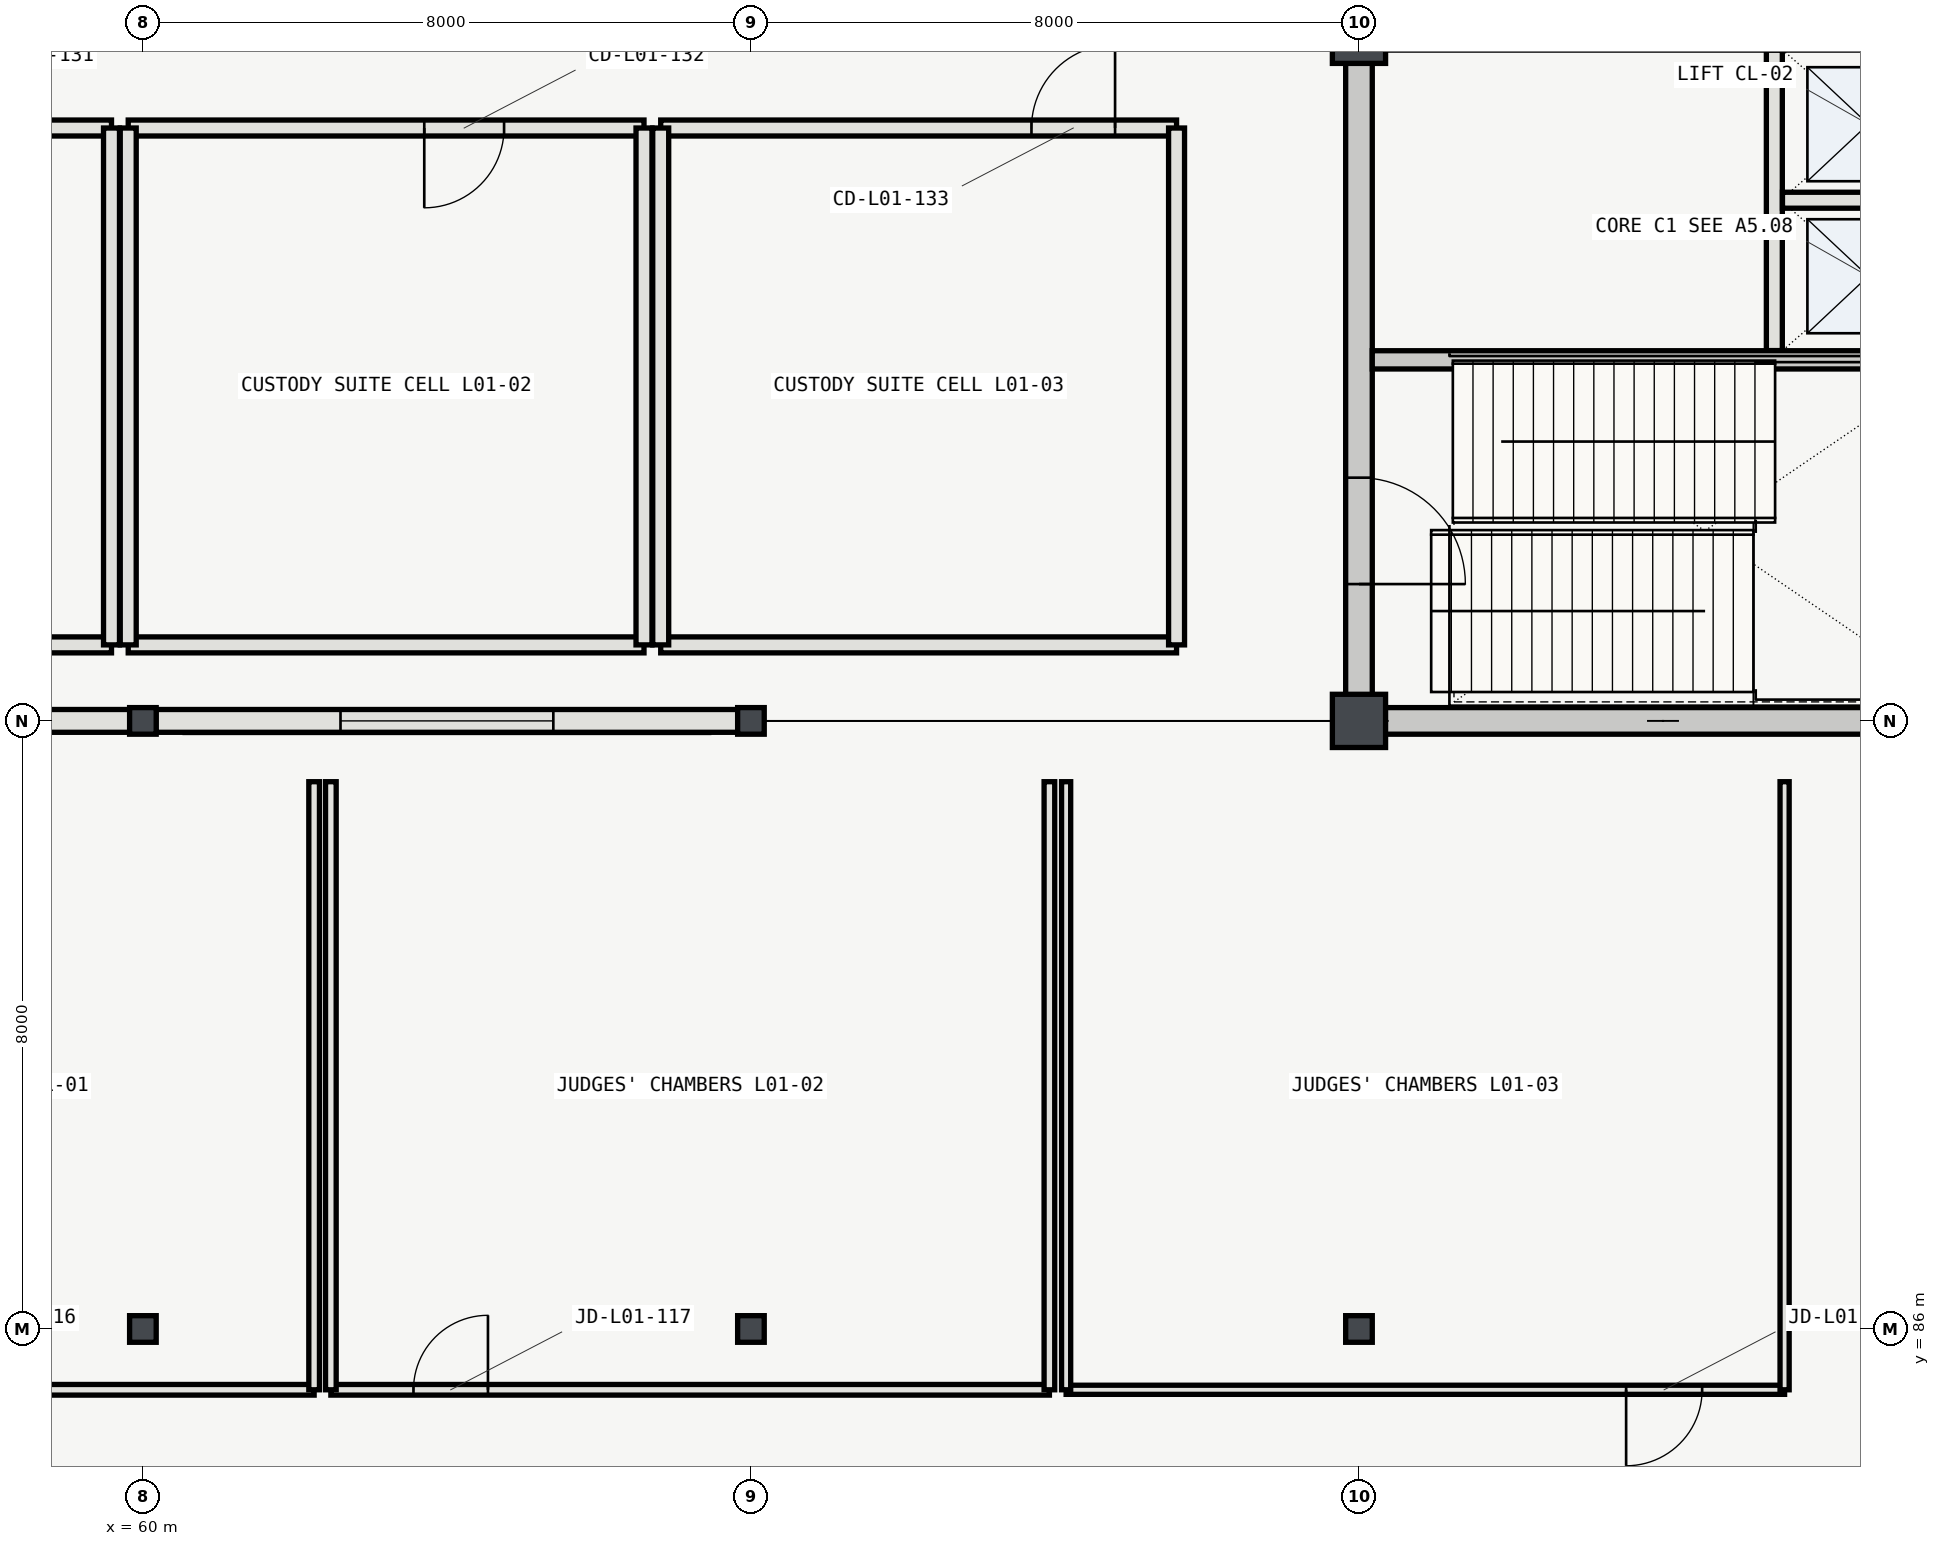
"""IFC4 building model, lengths in metres.
Left out: names, types, materials, properties, quantities, classifications, styles, units other than length and angle.
Written with IfcOpenShell. Run it as: python <this file> out.ifc"""

import sys

from ifc_helpers import new_model, si_unit, direction, frame, frame_2d, origin, origin_2d, place, context, subcontext, project, spatial, rectangle, i_section, extrude, element, fill, save


model = new_model("IFC4")
c1 = context("Model", 3, precision=1e-05, world=origin(), true_north=direction((0.0, 1.0)))
c2 = subcontext(c1, "Body", "Model", "MODEL_VIEW")
j1 = project(units=[si_unit("LENGTHUNIT", "METRE"), si_unit("PLANEANGLEUNIT", "RADIAN")], contexts=[c1])
p1 = place(None, origin())
s1 = spatial("IfcSite", under=j1, at=p1, CompositionType="ELEMENT")
p2 = place(p1, origin())
s2 = spatial("IfcBuilding", under=s1, at=p2, CompositionType="ELEMENT")
p3 = place(p2, frame((0.0, 0.0, 5.4)))
s3 = spatial("IfcBuildingStorey", under=s2, at=p3, CompositionType="ELEMENT", Elevation=5.4)
for number, where, z_axis, x_axis in (
    (1, (60.0, 86.0, 0.0), (0.0, 0.0, 1.0), (1.0, 0.0, 0.0)),
    (2, (60.0, 94.0, 0.0), (0.0, 0.0, 1.0), (1.0, 0.0, 0.0)),
    (3, (68.0, 86.0, 0.0), (0.0, 0.0, 1.0), (1.0, 0.0, 0.0)),
    (4, (68.0, 94.0, 0.0), (0.0, 0.0, 1.0), (1.0, 0.0, 0.0)),
    (5, (76.0, 86.0, 0.0), (0.0, 0.0, 1.0), (1.0, 0.0, 0.0)),
):
    element("IfcColumn", number, at=place(p3, frame(where, z_axis=z_axis, x_axis=x_axis)), inside=s3, PredefinedType="COLUMN", context=c2, shape_type="SweptSolid", body=[
        extrude(i_section(OverallWidth=0.35, OverallDepth=0.35, WebThickness=0.012, FlangeThickness=0.019, FilletRadius=0.02, at=origin_2d()), origin(), (0.0, 0.0, 1.0), 5.4),
    ])
for number, where, z_axis, x_axis in (
    (6, (76.0, 94.0, 0.0), (0.0, 0.0, 1.0), (1.0, 0.0, 0.0)),
    (7, (76.0, 103.0, 0.0), (0.0, 0.0, 1.0), (1.0, 0.0, 0.0)),
):
    element("IfcColumn", number, at=place(p3, frame(where, z_axis=z_axis, x_axis=x_axis)), inside=s3, PredefinedType="COLUMN", context=c2, shape_type="SweptSolid", body=[
        extrude(rectangle(XDim=0.7, YDim=0.7, at=origin_2d()), origin(), (0.0, 0.0, 1.0), 5.4),
    ])
p4 = place(p3, frame((59.829, 94.0, 0.0), z_axis=(0.0, 0.0, 1.0), x_axis=(-1.0, 0.0, 0.0)))
e8 = element("IfcWall", 8, at=p4, inside=s3, PredefinedType="SOLIDWALL", context=c2, shape_type="SweptSolid", body=[
    extrude(rectangle(XDim=7.658, YDim=0.3, at=frame_2d((3.829, 0.0))), origin(), (0.0, 0.0, 1.0), 4.803),
])
p5 = place(p4, frame((2.229, 0.0, 0.95)))
e9 = element("IfcOpeningElement", 9, at=p5, cuts=e8, PredefinedType="OPENING", context=c2, shape_type="SweptSolid", body=[
    extrude(rectangle(XDim=3.2, YDim=2.6, at=frame_2d((1.6, 1.3))), frame((0.0, 0.16, 0.0), z_axis=(0.0, -1.0, 0.0), x_axis=(1.0, 0.0, 0.0)), (0.0, 0.0, 1.0), 0.32),
])
p6 = place(p3, frame((67.829, 94.0, 0.0), z_axis=(0.0, 0.0, 1.0), x_axis=(-1.0, 0.0, 0.0)))
e10 = element("IfcWall", 10, at=p6, inside=s3, PredefinedType="SOLIDWALL", context=c2, shape_type="SweptSolid", body=[
    extrude(rectangle(XDim=7.658, YDim=0.3, at=frame_2d((3.829, 0.0))), origin(), (0.0, 0.0, 1.0), 4.803),
])
p7 = place(p6, frame((2.429, 0.0, 0.95)))
e11 = element("IfcOpeningElement", 11, at=p7, cuts=e10, PredefinedType="OPENING", context=c2, shape_type="SweptSolid", body=[
    extrude(rectangle(XDim=2.8, YDim=2.6, at=frame_2d((1.4, 1.3))), frame((0.0, 0.16, 0.0), z_axis=(0.0, -1.0, 0.0), x_axis=(1.0, 0.0, 0.0)), (0.0, 0.0, 1.0), 0.32),
])
p8 = place(p3, frame((75.825, 94.0, 0.0), z_axis=(0.0, 0.0, 1.0), x_axis=(1.0, 0.0, 0.0)))
e12 = element("IfcWall", 12, at=p8, inside=s3, PredefinedType="SHEAR", context=c2, shape_type="SweptSolid", body=[
    extrude(rectangle(XDim=8.35, YDim=0.35, at=frame_2d((4.175, 0.0))), origin(), (0.0, 0.0, 1.0), 5.12),
])
p9 = place(p3, frame((76.0, 94.175, 0.0), z_axis=(0.0, 0.0, 1.0), x_axis=(0.0, 1.0, 0.0)))
e13 = element("IfcWall", 13, at=p9, inside=s3, PredefinedType="SHEAR", context=c2, shape_type="SweptSolid", body=[
    extrude(rectangle(XDim=8.65, YDim=0.35, at=frame_2d((4.325, 0.0))), origin(), (0.0, 0.0, 1.0), 5.12),
])
p10 = place(p9, frame((1.625, 0.0, 0.0)))
e14 = element("IfcOpeningElement", 14, at=p10, cuts=e13, PredefinedType="OPENING", context=c2, shape_type="SweptSolid", body=[
    extrude(rectangle(XDim=1.4, YDim=2.2, at=frame_2d((0.7, 1.1))), frame((0.0, 0.185, 0.0), z_axis=(0.0, -1.0, 0.0), x_axis=(1.0, 0.0, 0.0)), (0.0, 0.0, 1.0), 0.37),
])
p11 = place(p3, frame((81.465, 98.872, 0.0), z_axis=(0.0, 0.0, 1.0), x_axis=(0.0, 1.0, 0.0)))
e15 = element("IfcWall", 15, at=p11, inside=s3, PredefinedType="PARTITIONING", context=c2, shape_type="SweptSolid", body=[
    extrude(rectangle(XDim=3.951, YDim=0.21, at=frame_2d((1.976, 0.0))), origin(), (0.0, 0.0, 1.0), 5.12),
])
p12 = place(p3, frame((81.572, 100.85, 0.0), z_axis=(0.0, 0.0, 1.0), x_axis=(1.0, 0.0, 0.0)))
e16 = element("IfcWall", 16, at=p12, inside=s3, PredefinedType="PARTITIONING", context=c2, shape_type="SweptSolid", body=[
    extrude(rectangle(XDim=2.251, YDim=0.21, at=frame_2d((1.125, 0.0))), origin(), (0.0, 0.0, 1.0), 5.12),
])
p13 = place(p3, frame((52.8, 85.2, 0.0), z_axis=(0.0, 0.0, 1.0), x_axis=(1.0, 0.0, 0.0)))
e17 = element("IfcWall", 17, at=p13, inside=s3, PredefinedType="PARTITIONING", context=c2, shape_type="SweptSolid", body=[
    extrude(rectangle(XDim=9.453, YDim=0.14, at=frame_2d((4.727, 0.0))), origin(), (0.0, 0.0, 1.0), 5.12),
])
p14 = place(p13, frame((2.656, 0.0, 0.0)))
e18 = element("IfcOpeningElement", 18, at=p14, cuts=e17, PredefinedType="OPENING", context=c2, shape_type="SweptSolid", body=[
    extrude(rectangle(XDim=1.0, YDim=2.2, at=frame_2d((0.5, 1.1))), frame((0.0, 0.08, 0.0), z_axis=(0.0, -1.0, 0.0), x_axis=(1.0, 0.0, 0.0)), (0.0, 0.0, 1.0), 0.16),
])
p15 = place(p3, frame((62.253, 85.2, 0.0), z_axis=(0.0, 0.0, 1.0), x_axis=(0.0, 1.0, 0.0)))
e19 = element("IfcWall", 19, at=p15, inside=s3, PredefinedType="PARTITIONING", context=c2, shape_type="SweptSolid", body=[
    extrude(rectangle(XDim=8.0, YDim=0.14, at=frame_2d((4.0, 0.0))), origin(), (0.0, 0.0, 1.0), 5.12),
])
p16 = place(p3, frame((62.473, 85.2, 0.0), z_axis=(0.0, 0.0, 1.0), x_axis=(1.0, 0.0, 0.0)))
e20 = element("IfcWall", 20, at=p16, inside=s3, PredefinedType="PARTITIONING", context=c2, shape_type="SweptSolid", body=[
    extrude(rectangle(XDim=9.454, YDim=0.14, at=frame_2d((4.727, 0.0))), origin(), (0.0, 0.0, 1.0), 5.12),
])
p17 = place(p16, frame((1.087, 0.0, 0.0)))
e21 = element("IfcOpeningElement", 21, at=p17, cuts=e20, PredefinedType="OPENING", context=c2, shape_type="SweptSolid", body=[
    extrude(rectangle(XDim=0.98, YDim=2.2, at=frame_2d((0.49, 1.1))), frame((0.0, 0.08, 0.0), z_axis=(0.0, -1.0, 0.0), x_axis=(1.0, 0.0, 0.0)), (0.0, 0.0, 1.0), 0.16),
])
p18 = place(p3, frame((62.473, 93.2, 0.0), z_axis=(0.0, 0.0, 1.0), x_axis=(0.0, -1.0, 0.0)))
e22 = element("IfcWall", 22, at=p18, inside=s3, PredefinedType="PARTITIONING", context=c2, shape_type="SweptSolid", body=[
    extrude(rectangle(XDim=8.0, YDim=0.14, at=frame_2d((4.0, 0.0))), origin(), (0.0, 0.0, 1.0), 5.12),
])
p19 = place(p3, frame((71.927, 85.2, 0.0), z_axis=(0.0, 0.0, 1.0), x_axis=(0.0, 1.0, 0.0)))
e23 = element("IfcWall", 23, at=p19, inside=s3, PredefinedType="PARTITIONING", context=c2, shape_type="SweptSolid", body=[
    extrude(rectangle(XDim=8.0, YDim=0.14, at=frame_2d((4.0, 0.0))), origin(), (0.0, 0.0, 1.0), 4.806),
])
p20 = place(p3, frame((72.147, 85.2, 0.0), z_axis=(0.0, 0.0, 1.0), x_axis=(1.0, 0.0, 0.0)))
e24 = element("IfcWall", 24, at=p20, inside=s3, PredefinedType="PARTITIONING", context=c2, shape_type="SweptSolid", body=[
    extrude(rectangle(XDim=9.453, YDim=0.12, at=frame_2d((4.727, 0.0))), origin(), (0.0, 0.0, 1.0), 5.12),
])
p21 = place(p20, frame((7.368, 0.0, 0.0)))
e25 = element("IfcOpeningElement", 25, at=p21, cuts=e24, PredefinedType="OPENING", context=c2, shape_type="SweptSolid", body=[
    extrude(rectangle(XDim=1.0, YDim=2.15, at=frame_2d((0.5, 1.075))), frame((0.0, 0.07, 0.0), z_axis=(0.0, -1.0, 0.0), x_axis=(1.0, 0.0, 0.0)), (0.0, 0.0, 1.0), 0.14),
])
p22 = place(p3, frame((72.147, 93.2, 0.0), z_axis=(0.0, 0.0, 1.0), x_axis=(0.0, -1.0, 0.0)))
e26 = element("IfcWall", 26, at=p22, inside=s3, PredefinedType="PARTITIONING", context=c2, shape_type="SweptSolid", body=[
    extrude(rectangle(XDim=8.0, YDim=0.12, at=frame_2d((4.0, 0.0))), origin(), (0.0, 0.0, 1.0), 4.806),
])
p23 = place(p3, frame((81.6, 85.2, 0.0), z_axis=(0.0, 0.0, 1.0), x_axis=(0.0, 1.0, 0.0)))
e27 = element("IfcWall", 27, at=p23, inside=s3, PredefinedType="PARTITIONING", context=c2, shape_type="SweptSolid", body=[
    extrude(rectangle(XDim=8.0, YDim=0.12, at=frame_2d((4.0, 0.0))), origin(), (0.0, 0.0, 1.0), 5.12),
])
p24 = place(p3, frame((52.8, 95.0, 0.0), z_axis=(0.0, 0.0, 1.0), x_axis=(1.0, 0.0, 0.0)))
e28 = element("IfcWall", 28, at=p24, inside=s3, PredefinedType="PARTITIONING", context=c2, shape_type="SweptSolid", body=[
    extrude(rectangle(XDim=6.787, YDim=0.21, at=frame_2d((3.394, 0.0))), origin(), (0.0, 0.0, 1.0), 5.12),
])
p25 = place(p3, frame((59.587, 101.8, 0.0), z_axis=(0.0, 0.0, 1.0), x_axis=(-1.0, 0.0, 0.0)))
e29 = element("IfcWall", 29, at=p25, inside=s3, PredefinedType="PARTITIONING", context=c2, shape_type="SweptSolid", body=[
    extrude(rectangle(XDim=6.787, YDim=0.21, at=frame_2d((3.394, 0.0))), origin(), (0.0, 0.0, 1.0), 5.12),
])
p26 = place(p25, frame((2.844, 0.0, 0.0)))
e30 = element("IfcOpeningElement", 30, at=p26, cuts=e29, PredefinedType="OPENING", context=c2, shape_type="SweptSolid", body=[
    extrude(rectangle(XDim=1.1, YDim=2.15, at=frame_2d((0.55, 1.075))), frame((0.0, 0.115, 0.0), z_axis=(0.0, -1.0, 0.0), x_axis=(1.0, 0.0, 0.0)), (0.0, 0.0, 1.0), 0.23),
])
p27 = place(p3, frame((59.587, 95.0, 0.0), z_axis=(0.0, 0.0, 1.0), x_axis=(0.0, 1.0, 0.0)))
e31 = element("IfcWall", 31, at=p27, inside=s3, PredefinedType="PARTITIONING", context=c2, shape_type="SweptSolid", body=[
    extrude(rectangle(XDim=6.8, YDim=0.21, at=frame_2d((3.4, 0.0))), origin(), (0.0, 0.0, 1.0), 5.12),
])
p28 = place(p3, frame((59.807, 95.0, 0.0), z_axis=(0.0, 0.0, 1.0), x_axis=(1.0, 0.0, 0.0)))
e32 = element("IfcWall", 32, at=p28, inside=s3, PredefinedType="PARTITIONING", context=c2, shape_type="SweptSolid", body=[
    extrude(rectangle(XDim=6.786, YDim=0.21, at=frame_2d((3.393, 0.0))), origin(), (0.0, 0.0, 1.0), 5.12),
])
p29 = place(p3, frame((66.593, 101.8, 0.0), z_axis=(0.0, 0.0, 1.0), x_axis=(-1.0, 0.0, 0.0)))
e33 = element("IfcWall", 33, at=p29, inside=s3, PredefinedType="PARTITIONING", context=c2, shape_type="SweptSolid", body=[
    extrude(rectangle(XDim=6.786, YDim=0.21, at=frame_2d((3.393, 0.0))), origin(), (0.0, 0.0, 1.0), 5.12),
])
p30 = place(p29, frame((1.841, 0.0, 0.0)))
e34 = element("IfcOpeningElement", 34, at=p30, cuts=e33, PredefinedType="OPENING", context=c2, shape_type="SweptSolid", body=[
    extrude(rectangle(XDim=1.05, YDim=2.15, at=frame_2d((0.525, 1.075))), frame((0.0, 0.115, 0.0), z_axis=(0.0, -1.0, 0.0), x_axis=(1.0, 0.0, 0.0)), (0.0, 0.0, 1.0), 0.23),
])
p31 = place(p3, frame((59.807, 101.8, 0.0), z_axis=(0.0, 0.0, 1.0), x_axis=(0.0, -1.0, 0.0)))
e35 = element("IfcWall", 35, at=p31, inside=s3, PredefinedType="PARTITIONING", context=c2, shape_type="SweptSolid", body=[
    extrude(rectangle(XDim=6.8, YDim=0.21, at=frame_2d((3.4, 0.0))), origin(), (0.0, 0.0, 1.0), 4.644),
])
p32 = place(p3, frame((66.593, 95.0, 0.0), z_axis=(0.0, 0.0, 1.0), x_axis=(0.0, 1.0, 0.0)))
e36 = element("IfcWall", 36, at=p32, inside=s3, PredefinedType="PARTITIONING", context=c2, shape_type="SweptSolid", body=[
    extrude(rectangle(XDim=6.8, YDim=0.21, at=frame_2d((3.4, 0.0))), origin(), (0.0, 0.0, 1.0), 5.12),
])
p33 = place(p3, frame((66.813, 95.0, 0.0), z_axis=(0.0, 0.0, 1.0), x_axis=(1.0, 0.0, 0.0)))
e37 = element("IfcWall", 37, at=p33, inside=s3, PredefinedType="PARTITIONING", context=c2, shape_type="SweptSolid", body=[
    extrude(rectangle(XDim=6.787, YDim=0.21, at=frame_2d((3.394, 0.0))), origin(), (0.0, 0.0, 1.0), 5.12),
])
p34 = place(p3, frame((73.6, 101.8, 0.0), z_axis=(0.0, 0.0, 1.0), x_axis=(-1.0, 0.0, 0.0)))
e38 = element("IfcWall", 38, at=p34, inside=s3, PredefinedType="PARTITIONING", context=c2, shape_type="SweptSolid", body=[
    extrude(rectangle(XDim=6.787, YDim=0.21, at=frame_2d((3.394, 0.0))), origin(), (0.0, 0.0, 1.0), 5.12),
])
p35 = place(p34, frame((0.809, 0.0, 0.0)))
e39 = element("IfcOpeningElement", 39, at=p35, cuts=e38, PredefinedType="OPENING", context=c2, shape_type="SweptSolid", body=[
    extrude(rectangle(XDim=1.1, YDim=2.15, at=frame_2d((0.55, 1.075))), frame((0.0, 0.115, 0.0), z_axis=(0.0, -1.0, 0.0), x_axis=(1.0, 0.0, 0.0)), (0.0, 0.0, 1.0), 0.23),
])
for number, where, z_axis, x_axis in (
    (40, (66.813, 101.8, 0.0), (0.0, 0.0, 1.0), (0.0, -1.0, 0.0)),
    (41, (73.6, 95.0, 0.0), (0.0, 0.0, 1.0), (0.0, 1.0, 0.0)),
):
    element("IfcWall", number, at=place(p3, frame(where, z_axis=z_axis, x_axis=x_axis)), inside=s3, PredefinedType="PARTITIONING", context=c2, shape_type="SweptSolid", body=[
        extrude(rectangle(XDim=6.8, YDim=0.21, at=frame_2d((3.4, 0.0))), origin(), (0.0, 0.0, 1.0), 5.12),
    ])
p36 = place(p3, frame((76.175, 98.75, 0.0), z_axis=(0.0, 0.0, 1.0), x_axis=(1.0, 0.0, 0.0)))
e42 = element("IfcWall", 42, at=p36, inside=s3, PredefinedType="SHEAR", context=c2, shape_type="SweptSolid", body=[
    extrude(rectangle(XDim=7.65, YDim=0.24, at=frame_2d((3.825, 0.0))), origin(), (0.0, 0.0, 1.0), 5.12),
])
p37 = place(p7, origin())
e43 = element("IfcWindow", 43, at=p37, inside=s3, PartitioningType="SINGLE_PANEL", PredefinedType="WINDOW", context=c2, shape_type="SweptSolid", body=[
    extrude(rectangle(XDim=2.8, YDim=2.6, at=frame_2d((1.4, 1.3))), frame((0.0, 0.03, 0.0), z_axis=(0.0, -1.0, 0.0), x_axis=(1.0, 0.0, 0.0)), (0.0, 0.0, 1.0), 0.06),
])
fill(e11, e43)
p38 = place(p10, origin())
e44 = element("IfcDoor", 44, at=p38, inside=s3, OperationType="SINGLE_SWING_LEFT", PredefinedType="DOOR", context=c2, shape_type="SweptSolid", body=[
    extrude(rectangle(XDim=1.4, YDim=2.2, at=frame_2d((0.7, 1.1))), frame((0.0, 0.025, 0.0), z_axis=(0.0, -1.0, 0.0), x_axis=(1.0, 0.0, 0.0)), (0.0, 0.0, 1.0), 0.05),
])
fill(e14, e44)
p39 = place(p17, origin())
e45 = element("IfcDoor", 45, at=p39, inside=s3, OperationType="SINGLE_SWING_RIGHT", PredefinedType="DOOR", context=c2, shape_type="SweptSolid", body=[
    extrude(rectangle(XDim=0.98, YDim=2.2, at=frame_2d((0.49, 1.1))), frame((0.0, 0.025, 0.0), z_axis=(0.0, -1.0, 0.0), x_axis=(1.0, 0.0, 0.0)), (0.0, 0.0, 1.0), 0.05),
])
fill(e21, e45)
p40 = place(p21, origin())
e46 = element("IfcDoor", 46, at=p40, inside=s3, OperationType="SINGLE_SWING_LEFT", PredefinedType="DOOR", context=c2, shape_type="SweptSolid", body=[
    extrude(rectangle(XDim=1.0, YDim=2.15, at=frame_2d((0.5, 1.075))), frame((0.0, 0.025, 0.0), z_axis=(0.0, -1.0, 0.0), x_axis=(1.0, 0.0, 0.0)), (0.0, 0.0, 1.0), 0.05),
])
fill(e25, e46)
p41 = place(p30, origin())
e47 = element("IfcDoor", 47, at=p41, inside=s3, OperationType="SINGLE_SWING_RIGHT", PredefinedType="DOOR", context=c2, shape_type="SweptSolid", body=[
    extrude(rectangle(XDim=1.05, YDim=2.15, at=frame_2d((0.525, 1.075))), frame((0.0, 0.025, 0.0), z_axis=(0.0, -1.0, 0.0), x_axis=(1.0, 0.0, 0.0)), (0.0, 0.0, 1.0), 0.05),
])
fill(e34, e47)
p42 = place(p35, origin())
e48 = element("IfcDoor", 48, at=p42, inside=s3, OperationType="SINGLE_SWING_LEFT", PredefinedType="DOOR", context=c2, shape_type="SweptSolid", body=[
    extrude(rectangle(XDim=1.1, YDim=2.15, at=frame_2d((0.55, 1.075))), frame((0.0, 0.025, 0.0), z_axis=(0.0, -1.0, 0.0), x_axis=(1.0, 0.0, 0.0)), (0.0, 0.0, 1.0), 0.05),
])
fill(e39, e48)
save(model, sys.argv[1])
